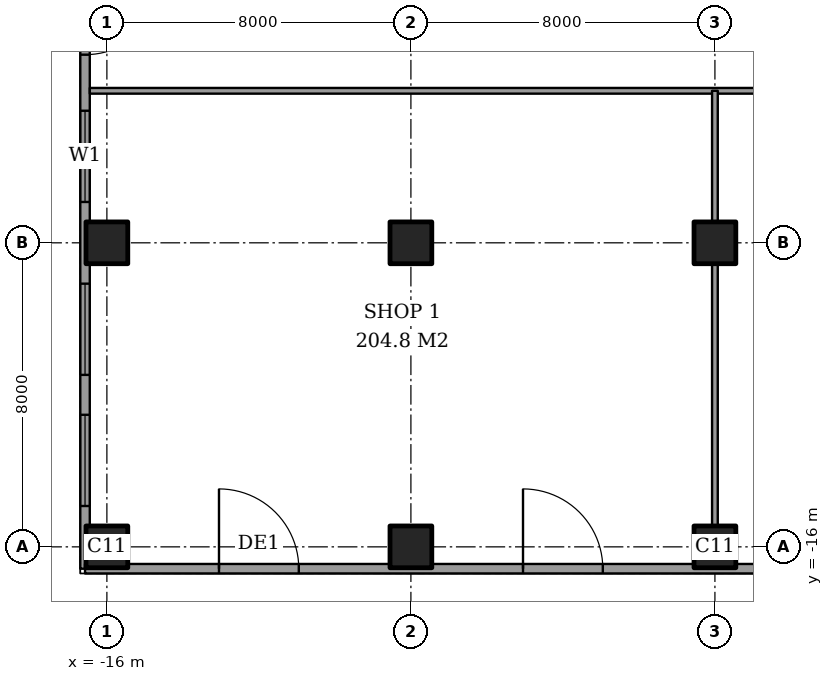
"""IFC4 building model, lengths in metres.
Left out: names, types, materials, properties, quantities, classifications, styles, units other than length and angle.
Written with IfcOpenShell. Run it as: python <this file> out.ifc"""

import sys

from ifc_helpers import new_model, si_unit, direction, frame, frame_2d, origin, origin_2d, place, context, subcontext, project, spatial, rectangle, extrude, element, fill, save


model = new_model("IFC4")
c1 = context("Model", 3, precision=1e-05, world=origin(), true_north=direction((0.0, 1.0)))
c2 = subcontext(c1, "Body", "Model", "MODEL_VIEW")
j1 = project(units=[si_unit("LENGTHUNIT", "METRE"), si_unit("PLANEANGLEUNIT", "RADIAN")], contexts=[c1])
p1 = place(None, origin())
s1 = spatial("IfcSite", under=j1, at=p1, CompositionType="ELEMENT")
p2 = place(p1, origin())
s2 = spatial("IfcBuilding", under=s1, at=p2, CompositionType="ELEMENT")
p3 = place(p2, origin())
s3 = spatial("IfcBuildingStorey", under=s2, at=p3, CompositionType="ELEMENT", Elevation=0.0)
for number, where, z_axis, x_axis in (
    (1, (-16.0, -16.0, 0.0), (0.0, 0.0, 1.0), (1.0, 0.0, 0.0)),
    (2, (-16.0, -8.0, 0.0), (0.0, 0.0, 1.0), (1.0, 0.0, 0.0)),
    (3, (-8.0, -16.0, 0.0), (0.0, 0.0, 1.0), (1.0, 0.0, 0.0)),
    (4, (-8.0, -8.0, 0.0), (0.0, 0.0, 1.0), (1.0, 0.0, 0.0)),
    (5, (0.0, -16.0, 0.0), (0.0, 0.0, 1.0), (1.0, 0.0, 0.0)),
    (6, (0.0, -8.0, 0.0), (0.0, 0.0, 1.0), (1.0, 0.0, 0.0)),
):
    element("IfcColumn", number, at=place(p3, frame(where, z_axis=z_axis, x_axis=x_axis)), inside=s3, PredefinedType="COLUMN", context=c2, shape_type="SweptSolid", body=[
        extrude(rectangle(XDim=1.1, YDim=1.1, at=origin_2d()), origin(), (0.0, 0.0, 1.0), 6.0),
    ])
p4 = place(p3, frame((-16.575, 56.575, 0.0), z_axis=(0.0, 0.0, 1.0), x_axis=(0.0, -1.0, 0.0)))
e7 = element("IfcWall", 7, at=p4, inside=s3, PredefinedType="SOLIDWALL", context=c2, shape_type="SweptSolid", body=[
    extrude(rectangle(XDim=73.15, YDim=0.25, at=frame_2d((36.575, 0.0))), origin(), (0.0, 0.0, 1.0), 6.0),
])
p5 = place(p4, frame((1.65, 0.0, 0.3)))
e8 = element("IfcOpeningElement", 8, at=p5, cuts=e7, PredefinedType="OPENING", context=c2, shape_type="SweptSolid", body=[
    extrude(rectangle(XDim=2.4, YDim=3.6, at=frame_2d((1.2, 1.8))), frame((0.0, 0.135, 0.0), z_axis=(0.0, -1.0, 0.0), x_axis=(1.0, 0.0, 0.0)), (0.0, 0.0, 1.0), 0.27),
])
p6 = place(p4, frame((5.1, 0.0, 0.3)))
e9 = element("IfcOpeningElement", 9, at=p6, cuts=e7, PredefinedType="OPENING", context=c2, shape_type="SweptSolid", body=[
    extrude(rectangle(XDim=2.4, YDim=3.6, at=frame_2d((1.2, 1.8))), frame((0.0, 0.135, 0.0), z_axis=(0.0, -1.0, 0.0), x_axis=(1.0, 0.0, 0.0)), (0.0, 0.0, 1.0), 0.27),
])
p7 = place(p4, frame((9.65, 0.0, 0.3)))
e10 = element("IfcOpeningElement", 10, at=p7, cuts=e7, PredefinedType="OPENING", context=c2, shape_type="SweptSolid", body=[
    extrude(rectangle(XDim=2.4, YDim=3.6, at=frame_2d((1.2, 1.8))), frame((0.0, 0.135, 0.0), z_axis=(0.0, -1.0, 0.0), x_axis=(1.0, 0.0, 0.0)), (0.0, 0.0, 1.0), 0.27),
])
p8 = place(p4, frame((19.525, 0.0, 0.0)))
e11 = element("IfcOpeningElement", 11, at=p8, cuts=e7, PredefinedType="OPENING", context=c2, shape_type="SweptSolid", body=[
    extrude(rectangle(XDim=2.1, YDim=2.4, at=frame_2d((1.05, 1.2))), frame((0.0, 0.135, 0.0), z_axis=(0.0, -1.0, 0.0), x_axis=(1.0, 0.0, 0.0)), (0.0, 0.0, 1.0), 0.27),
])
p9 = place(p4, frame((13.1, 0.0, 0.3)))
e12 = element("IfcOpeningElement", 12, at=p9, cuts=e7, PredefinedType="OPENING", context=c2, shape_type="SweptSolid", body=[
    extrude(rectangle(XDim=2.4, YDim=3.6, at=frame_2d((1.2, 1.8))), frame((0.0, 0.135, 0.0), z_axis=(0.0, -1.0, 0.0), x_axis=(1.0, 0.0, 0.0)), (0.0, 0.0, 1.0), 0.27),
])
p10 = place(p4, frame((25.65, 0.0, 0.3)))
e13 = element("IfcOpeningElement", 13, at=p10, cuts=e7, PredefinedType="OPENING", context=c2, shape_type="SweptSolid", body=[
    extrude(rectangle(XDim=2.4, YDim=3.6, at=frame_2d((1.2, 1.8))), frame((0.0, 0.135, 0.0), z_axis=(0.0, -1.0, 0.0), x_axis=(1.0, 0.0, 0.0)), (0.0, 0.0, 1.0), 0.27),
])
p11 = place(p4, frame((29.1, 0.0, 0.3)))
e14 = element("IfcOpeningElement", 14, at=p11, cuts=e7, PredefinedType="OPENING", context=c2, shape_type="SweptSolid", body=[
    extrude(rectangle(XDim=2.4, YDim=3.6, at=frame_2d((1.2, 1.8))), frame((0.0, 0.135, 0.0), z_axis=(0.0, -1.0, 0.0), x_axis=(1.0, 0.0, 0.0)), (0.0, 0.0, 1.0), 0.27),
])
p12 = place(p4, frame((35.525, 0.0, 0.0)))
e15 = element("IfcOpeningElement", 15, at=p12, cuts=e7, PredefinedType="OPENING", context=c2, shape_type="SweptSolid", body=[
    extrude(rectangle(XDim=2.1, YDim=2.4, at=frame_2d((1.05, 1.2))), frame((0.0, 0.135, 0.0), z_axis=(0.0, -1.0, 0.0), x_axis=(1.0, 0.0, 0.0)), (0.0, 0.0, 1.0), 0.27),
])
p13 = place(p4, frame((43.525, 0.0, 0.0)))
e16 = element("IfcOpeningElement", 16, at=p13, cuts=e7, PredefinedType="OPENING", context=c2, shape_type="SweptSolid", body=[
    extrude(rectangle(XDim=2.1, YDim=2.4, at=frame_2d((1.05, 1.2))), frame((0.0, 0.135, 0.0), z_axis=(0.0, -1.0, 0.0), x_axis=(1.0, 0.0, 0.0)), (0.0, 0.0, 1.0), 0.27),
])
p14 = place(p4, frame((51.525, 0.0, 0.0)))
e17 = element("IfcOpeningElement", 17, at=p14, cuts=e7, PredefinedType="OPENING", context=c2, shape_type="SweptSolid", body=[
    extrude(rectangle(XDim=2.1, YDim=2.4, at=frame_2d((1.05, 1.2))), frame((0.0, 0.135, 0.0), z_axis=(0.0, -1.0, 0.0), x_axis=(1.0, 0.0, 0.0)), (0.0, 0.0, 1.0), 0.27),
])
p15 = place(p4, frame((57.525, 0.0, 0.0)))
e18 = element("IfcOpeningElement", 18, at=p15, cuts=e7, PredefinedType="OPENING", context=c2, shape_type="SweptSolid", body=[
    extrude(rectangle(XDim=2.1, YDim=2.4, at=frame_2d((1.05, 1.2))), frame((0.0, 0.135, 0.0), z_axis=(0.0, -1.0, 0.0), x_axis=(1.0, 0.0, 0.0)), (0.0, 0.0, 1.0), 0.27),
])
p16 = place(p4, frame((61.1, 0.0, 0.3)))
e19 = element("IfcOpeningElement", 19, at=p16, cuts=e7, PredefinedType="OPENING", context=c2, shape_type="SweptSolid", body=[
    extrude(rectangle(XDim=2.4, YDim=3.6, at=frame_2d((1.2, 1.8))), frame((0.0, 0.135, 0.0), z_axis=(0.0, -1.0, 0.0), x_axis=(1.0, 0.0, 0.0)), (0.0, 0.0, 1.0), 0.27),
])
p17 = place(p4, frame((65.65, 0.0, 0.3)))
e20 = element("IfcOpeningElement", 20, at=p17, cuts=e7, PredefinedType="OPENING", context=c2, shape_type="SweptSolid", body=[
    extrude(rectangle(XDim=2.4, YDim=3.6, at=frame_2d((1.2, 1.8))), frame((0.0, 0.135, 0.0), z_axis=(0.0, -1.0, 0.0), x_axis=(1.0, 0.0, 0.0)), (0.0, 0.0, 1.0), 0.27),
])
p18 = place(p4, frame((69.1, 0.0, 0.3)))
e21 = element("IfcOpeningElement", 21, at=p18, cuts=e7, PredefinedType="OPENING", context=c2, shape_type="SweptSolid", body=[
    extrude(rectangle(XDim=2.4, YDim=3.6, at=frame_2d((1.2, 1.8))), frame((0.0, 0.135, 0.0), z_axis=(0.0, -1.0, 0.0), x_axis=(1.0, 0.0, 0.0)), (0.0, 0.0, 1.0), 0.27),
])
p19 = place(p3, frame((-16.575, -16.575, 0.0), z_axis=(0.0, 0.0, 1.0), x_axis=(1.0, 0.0, 0.0)))
e22 = element("IfcWall", 22, at=p19, inside=s3, PredefinedType="SOLIDWALL", context=c2, shape_type="SweptSolid", body=[
    extrude(rectangle(XDim=99.15, YDim=0.25, at=frame_2d((49.575, 0.0))), origin(), (0.0, 0.0, 1.0), 6.0),
])
p20 = place(p19, frame((3.525, 0.0, 0.0)))
e23 = element("IfcOpeningElement", 23, at=p20, cuts=e22, PredefinedType="OPENING", context=c2, shape_type="SweptSolid", body=[
    extrude(rectangle(XDim=2.1, YDim=2.4, at=frame_2d((1.05, 1.2))), frame((0.0, 0.135, 0.0), z_axis=(0.0, -1.0, 0.0), x_axis=(1.0, 0.0, 0.0)), (0.0, 0.0, 1.0), 0.27),
])
p21 = place(p19, frame((11.525, 0.0, 0.0)))
e24 = element("IfcOpeningElement", 24, at=p21, cuts=e22, PredefinedType="OPENING", context=c2, shape_type="SweptSolid", body=[
    extrude(rectangle(XDim=2.1, YDim=2.4, at=frame_2d((1.05, 1.2))), frame((0.0, 0.135, 0.0), z_axis=(0.0, -1.0, 0.0), x_axis=(1.0, 0.0, 0.0)), (0.0, 0.0, 1.0), 0.27),
])
p22 = place(p19, frame((19.525, 0.0, 0.0)))
e25 = element("IfcOpeningElement", 25, at=p22, cuts=e22, PredefinedType="OPENING", context=c2, shape_type="SweptSolid", body=[
    extrude(rectangle(XDim=2.1, YDim=2.4, at=frame_2d((1.05, 1.2))), frame((0.0, 0.135, 0.0), z_axis=(0.0, -1.0, 0.0), x_axis=(1.0, 0.0, 0.0)), (0.0, 0.0, 1.0), 0.27),
])
p23 = place(p19, frame((27.525, 0.0, 0.0)))
e26 = element("IfcOpeningElement", 26, at=p23, cuts=e22, PredefinedType="OPENING", context=c2, shape_type="SweptSolid", body=[
    extrude(rectangle(XDim=2.1, YDim=2.4, at=frame_2d((1.05, 1.2))), frame((0.0, 0.135, 0.0), z_axis=(0.0, -1.0, 0.0), x_axis=(1.0, 0.0, 0.0)), (0.0, 0.0, 1.0), 0.27),
])
p24 = place(p19, frame((35.525, 0.0, 0.0)))
e27 = element("IfcOpeningElement", 27, at=p24, cuts=e22, PredefinedType="OPENING", context=c2, shape_type="SweptSolid", body=[
    extrude(rectangle(XDim=2.1, YDim=2.4, at=frame_2d((1.05, 1.2))), frame((0.0, 0.135, 0.0), z_axis=(0.0, -1.0, 0.0), x_axis=(1.0, 0.0, 0.0)), (0.0, 0.0, 1.0), 0.27),
])
p25 = place(p19, frame((44.025, 0.0, 0.0)))
e28 = element("IfcOpeningElement", 28, at=p25, cuts=e22, PredefinedType="OPENING", context=c2, shape_type="SweptSolid", body=[
    extrude(rectangle(XDim=2.1, YDim=2.4, at=frame_2d((1.05, 1.2))), frame((0.0, 0.135, 0.0), z_axis=(0.0, -1.0, 0.0), x_axis=(1.0, 0.0, 0.0)), (0.0, 0.0, 1.0), 0.27),
])
p26 = place(p19, frame((42.5, 0.0, 0.3)))
e29 = element("IfcOpeningElement", 29, at=p26, cuts=e22, PredefinedType="OPENING", context=c2, shape_type="SweptSolid", body=[
    extrude(rectangle(XDim=1.2, YDim=3.6, at=frame_2d((0.6, 1.8))), frame((0.0, 0.135, 0.0), z_axis=(0.0, -1.0, 0.0), x_axis=(1.0, 0.0, 0.0)), (0.0, 0.0, 1.0), 0.27),
])
p27 = place(p19, frame((46.45, 0.0, 0.3)))
e30 = element("IfcOpeningElement", 30, at=p27, cuts=e22, PredefinedType="OPENING", context=c2, shape_type="SweptSolid", body=[
    extrude(rectangle(XDim=1.2, YDim=3.6, at=frame_2d((0.6, 1.8))), frame((0.0, 0.135, 0.0), z_axis=(0.0, -1.0, 0.0), x_axis=(1.0, 0.0, 0.0)), (0.0, 0.0, 1.0), 0.27),
])
p28 = place(p19, frame((53.025, 0.0, 0.0)))
e31 = element("IfcOpeningElement", 31, at=p28, cuts=e22, PredefinedType="OPENING", context=c2, shape_type="SweptSolid", body=[
    extrude(rectangle(XDim=2.1, YDim=2.4, at=frame_2d((1.05, 1.2))), frame((0.0, 0.135, 0.0), z_axis=(0.0, -1.0, 0.0), x_axis=(1.0, 0.0, 0.0)), (0.0, 0.0, 1.0), 0.27),
])
p29 = place(p19, frame((61.525, 0.0, 0.0)))
e32 = element("IfcOpeningElement", 32, at=p29, cuts=e22, PredefinedType="OPENING", context=c2, shape_type="SweptSolid", body=[
    extrude(rectangle(XDim=2.1, YDim=2.4, at=frame_2d((1.05, 1.2))), frame((0.0, 0.135, 0.0), z_axis=(0.0, -1.0, 0.0), x_axis=(1.0, 0.0, 0.0)), (0.0, 0.0, 1.0), 0.27),
])
p30 = place(p19, frame((51.5, 0.0, 0.3)))
e33 = element("IfcOpeningElement", 33, at=p30, cuts=e22, PredefinedType="OPENING", context=c2, shape_type="SweptSolid", body=[
    extrude(rectangle(XDim=1.2, YDim=3.6, at=frame_2d((0.6, 1.8))), frame((0.0, 0.135, 0.0), z_axis=(0.0, -1.0, 0.0), x_axis=(1.0, 0.0, 0.0)), (0.0, 0.0, 1.0), 0.27),
])
p31 = place(p19, frame((55.45, 0.0, 0.3)))
e34 = element("IfcOpeningElement", 34, at=p31, cuts=e22, PredefinedType="OPENING", context=c2, shape_type="SweptSolid", body=[
    extrude(rectangle(XDim=1.2, YDim=3.6, at=frame_2d((0.6, 1.8))), frame((0.0, 0.135, 0.0), z_axis=(0.0, -1.0, 0.0), x_axis=(1.0, 0.0, 0.0)), (0.0, 0.0, 1.0), 0.27),
])
p32 = place(p19, frame((69.525, 0.0, 0.0)))
e35 = element("IfcOpeningElement", 35, at=p32, cuts=e22, PredefinedType="OPENING", context=c2, shape_type="SweptSolid", body=[
    extrude(rectangle(XDim=2.1, YDim=2.4, at=frame_2d((1.05, 1.2))), frame((0.0, 0.135, 0.0), z_axis=(0.0, -1.0, 0.0), x_axis=(1.0, 0.0, 0.0)), (0.0, 0.0, 1.0), 0.27),
])
p33 = place(p19, frame((77.525, 0.0, 0.0)))
e36 = element("IfcOpeningElement", 36, at=p33, cuts=e22, PredefinedType="OPENING", context=c2, shape_type="SweptSolid", body=[
    extrude(rectangle(XDim=2.1, YDim=2.4, at=frame_2d((1.05, 1.2))), frame((0.0, 0.135, 0.0), z_axis=(0.0, -1.0, 0.0), x_axis=(1.0, 0.0, 0.0)), (0.0, 0.0, 1.0), 0.27),
])
p34 = place(p19, frame((85.525, 0.0, 0.0)))
e37 = element("IfcOpeningElement", 37, at=p34, cuts=e22, PredefinedType="OPENING", context=c2, shape_type="SweptSolid", body=[
    extrude(rectangle(XDim=2.1, YDim=2.4, at=frame_2d((1.05, 1.2))), frame((0.0, 0.135, 0.0), z_axis=(0.0, -1.0, 0.0), x_axis=(1.0, 0.0, 0.0)), (0.0, 0.0, 1.0), 0.27),
])
p35 = place(p19, frame((93.525, 0.0, 0.0)))
e38 = element("IfcOpeningElement", 38, at=p35, cuts=e22, PredefinedType="OPENING", context=c2, shape_type="SweptSolid", body=[
    extrude(rectangle(XDim=2.1, YDim=2.4, at=frame_2d((1.05, 1.2))), frame((0.0, 0.135, 0.0), z_axis=(0.0, -1.0, 0.0), x_axis=(1.0, 0.0, 0.0)), (0.0, 0.0, 1.0), 0.27),
])
p36 = place(p3, frame((-16.45, -4.0, 0.0), z_axis=(0.0, 0.0, 1.0), x_axis=(1.0, 0.0, 0.0)))
e39 = element("IfcWall", 39, at=p36, inside=s3, PredefinedType="PARTITIONING", context=c2, shape_type="SweptSolid", body=[
    extrude(rectangle(XDim=84.75, YDim=0.15, at=frame_2d((42.375, 0.0))), origin(), (0.0, 0.0, 1.0), 5.7),
])
p37 = place(p3, frame((0.0, -15.45, 0.0), z_axis=(0.0, 0.0, 1.0), x_axis=(0.0, 1.0, 0.0)))
e40 = element("IfcWall", 40, at=p37, inside=s3, PredefinedType="PARTITIONING", context=c2, shape_type="SweptSolid", body=[
    extrude(rectangle(XDim=6.9, YDim=0.15, at=frame_2d((3.45, 0.0))), origin(), (0.0, 0.0, 1.0), 4.3),
])
p38 = place(p3, frame((0.0, -7.45, 0.0), z_axis=(0.0, 0.0, 1.0), x_axis=(0.0, 1.0, 0.0)))
e41 = element("IfcWall", 41, at=p38, inside=s3, PredefinedType="PARTITIONING", context=c2, shape_type="SweptSolid", body=[
    extrude(rectangle(XDim=3.45, YDim=0.15, at=frame_2d((1.725, 0.0))), origin(), (0.0, 0.0, 1.0), 4.3),
])
p39 = place(p15, origin())
e42 = element("IfcDoor", 42, at=p39, inside=s3, OperationType="DOUBLE_DOOR_DOUBLE_SWING", PredefinedType="DOOR", context=c2, shape_type="SweptSolid", body=[
    extrude(rectangle(XDim=2.1, YDim=2.4, at=frame_2d((1.05, 1.2))), frame((0.0, 0.025, 0.0), z_axis=(0.0, -1.0, 0.0), x_axis=(1.0, 0.0, 0.0)), (0.0, 0.0, 1.0), 0.05),
])
fill(e18, e42)
p40 = place(p16, origin())
e43 = element("IfcWindow", 43, at=p40, inside=s3, PartitioningType="SINGLE_PANEL", PredefinedType="WINDOW", context=c2, shape_type="SweptSolid", body=[
    extrude(rectangle(XDim=2.4, YDim=3.6, at=frame_2d((1.2, 1.8))), frame((0.0, 0.03, 0.0), z_axis=(0.0, -1.0, 0.0), x_axis=(1.0, 0.0, 0.0)), (0.0, 0.0, 1.0), 0.06),
])
fill(e19, e43)
p41 = place(p17, origin())
e44 = element("IfcWindow", 44, at=p41, inside=s3, PartitioningType="SINGLE_PANEL", PredefinedType="WINDOW", context=c2, shape_type="SweptSolid", body=[
    extrude(rectangle(XDim=2.4, YDim=3.6, at=frame_2d((1.2, 1.8))), frame((0.0, 0.03, 0.0), z_axis=(0.0, -1.0, 0.0), x_axis=(1.0, 0.0, 0.0)), (0.0, 0.0, 1.0), 0.06),
])
fill(e20, e44)
p42 = place(p18, origin())
e45 = element("IfcWindow", 45, at=p42, inside=s3, PartitioningType="SINGLE_PANEL", PredefinedType="WINDOW", context=c2, shape_type="SweptSolid", body=[
    extrude(rectangle(XDim=2.4, YDim=3.6, at=frame_2d((1.2, 1.8))), frame((0.0, 0.03, 0.0), z_axis=(0.0, -1.0, 0.0), x_axis=(1.0, 0.0, 0.0)), (0.0, 0.0, 1.0), 0.06),
])
fill(e21, e45)
p43 = place(p20, origin())
e46 = element("IfcDoor", 46, at=p43, inside=s3, OperationType="DOUBLE_DOOR_DOUBLE_SWING", PredefinedType="DOOR", context=c2, shape_type="SweptSolid", body=[
    extrude(rectangle(XDim=2.1, YDim=2.4, at=frame_2d((1.05, 1.2))), frame((0.0, 0.025, 0.0), z_axis=(0.0, -1.0, 0.0), x_axis=(1.0, 0.0, 0.0)), (0.0, 0.0, 1.0), 0.05),
])
fill(e23, e46)
p44 = place(p21, origin())
e47 = element("IfcDoor", 47, at=p44, inside=s3, OperationType="DOUBLE_DOOR_DOUBLE_SWING", PredefinedType="DOOR", context=c2, shape_type="SweptSolid", body=[
    extrude(rectangle(XDim=2.1, YDim=2.4, at=frame_2d((1.05, 1.2))), frame((0.0, 0.025, 0.0), z_axis=(0.0, -1.0, 0.0), x_axis=(1.0, 0.0, 0.0)), (0.0, 0.0, 1.0), 0.05),
])
fill(e24, e47)
save(model, sys.argv[1])
